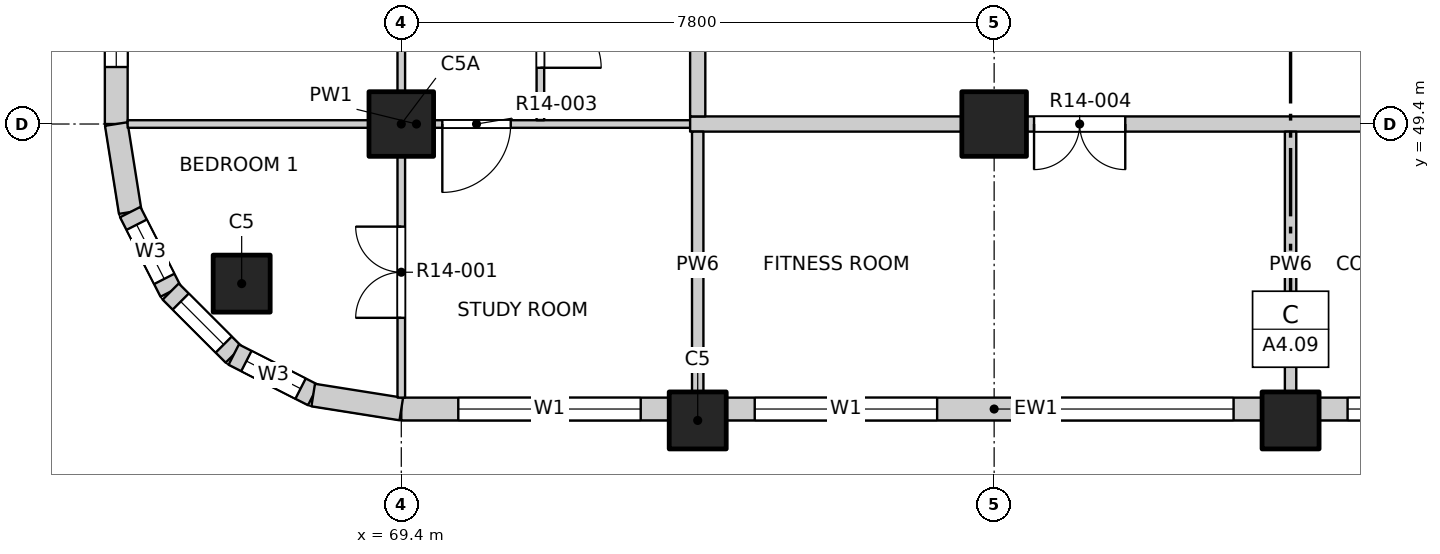
"""IFC4 building model, lengths in metres.
Left out: names, types, materials, properties, quantities, classifications, styles, units other than length and angle.
Written with IfcOpenShell. Run it as: python <this file> out.ifc"""

import sys

from ifc_helpers import new_model, si_unit, direction, frame, frame_2d, origin, origin_2d, place, context, subcontext, project, spatial, rectangle, extrude, element, fill, save


model = new_model("IFC4")
c1 = context("Model", 3, precision=1e-05, world=origin(), true_north=direction((0.0, 1.0)))
c2 = subcontext(c1, "Body", "Model", "MODEL_VIEW")
j1 = project(units=[si_unit("LENGTHUNIT", "METRE"), si_unit("PLANEANGLEUNIT", "RADIAN")], contexts=[c1])
p1 = place(None, origin())
s1 = spatial("IfcSite", under=j1, at=p1, CompositionType="ELEMENT")
p2 = place(p1, origin())
s2 = spatial("IfcBuilding", under=s1, at=p2, CompositionType="ELEMENT")
p3 = place(p2, frame((0.0, 0.0, 148.6)))
s3 = spatial("IfcBuildingStorey", under=s2, at=p3, CompositionType="ELEMENT", Elevation=148.6)
for number, where, z_axis, x_axis in (
    (1, (67.3, 47.3, -0.3), (0.0, 0.0, 1.0), (1.0, 0.0, 0.0)),
    (2, (73.3, 45.5, -0.3), (0.0, 0.0, 1.0), (1.0, 0.0, 0.0)),
    (3, (81.1, 45.5, -0.3), (0.0, 0.0, 1.0), (1.0, 0.0, 0.0)),
):
    element("IfcColumn", number, at=place(p3, frame(where, z_axis=z_axis, x_axis=x_axis)), inside=s3, PredefinedType="COLUMN", context=c2, shape_type="SweptSolid", body=[
        extrude(rectangle(XDim=0.75, YDim=0.75, at=origin_2d()), origin(), (0.0, 0.0, 1.0), 3.45),
    ])
for number, where, z_axis, x_axis in (
    (4, (69.4, 49.4, -0.3), (0.0, 0.0, 1.0), (1.0, 0.0, 0.0)),
    (5, (77.2, 49.4, -0.3), (0.0, 0.0, 1.0), (1.0, 0.0, 0.0)),
):
    element("IfcColumn", number, at=place(p3, frame(where, z_axis=z_axis, x_axis=x_axis)), inside=s3, PredefinedType="COLUMN", context=c2, shape_type="SweptSolid", body=[
        extrude(rectangle(XDim=0.85, YDim=0.85, at=origin_2d()), origin(), (0.0, 0.0, 1.0), 3.45),
    ])
p4 = place(p3, frame((69.4, 45.65, 0.0), z_axis=(0.0, 0.0, 1.0), x_axis=(1.0, 0.0, 0.0)))
e6 = element("IfcWall", 6, at=p4, inside=s3, PredefinedType="SOLIDWALL", context=c2, shape_type="SweptSolid", body=[
    extrude(rectangle(XDim=3.525, YDim=0.3, at=frame_2d((1.763, 0.0))), origin(), (0.0, 0.0, 1.0), 2.7),
])
p5 = place(p4, frame((0.75, 0.0, 0.9)))
e7 = element("IfcOpeningElement", 7, at=p5, cuts=e6, PredefinedType="OPENING", context=c2, shape_type="SweptSolid", body=[
    extrude(rectangle(XDim=2.4, YDim=1.8, at=frame_2d((1.2, 0.9))), frame((0.0, 0.16, 0.0), z_axis=(0.0, -1.0, 0.0), x_axis=(1.0, 0.0, 0.0)), (0.0, 0.0, 1.0), 0.32),
])
p6 = place(p3, frame((73.675, 45.65, 0.0), z_axis=(0.0, 0.0, 1.0), x_axis=(1.0, 0.0, 0.0)))
e8 = element("IfcWall", 8, at=p6, inside=s3, PredefinedType="SOLIDWALL", context=c2, shape_type="SweptSolid", body=[
    extrude(rectangle(XDim=7.05, YDim=0.3, at=frame_2d((3.525, 0.0))), origin(), (0.0, 0.0, 1.0), 2.7),
])
p7 = place(p6, frame((0.375, 0.0, 0.9)))
e9 = element("IfcOpeningElement", 9, at=p7, cuts=e8, PredefinedType="OPENING", context=c2, shape_type="SweptSolid", body=[
    extrude(rectangle(XDim=2.4, YDim=1.8, at=frame_2d((1.2, 0.9))), frame((0.0, 0.16, 0.0), z_axis=(0.0, -1.0, 0.0), x_axis=(1.0, 0.0, 0.0)), (0.0, 0.0, 1.0), 0.32),
])
p8 = place(p6, frame((4.275, 0.0, 0.9)))
e10 = element("IfcOpeningElement", 10, at=p8, cuts=e8, PredefinedType="OPENING", context=c2, shape_type="SweptSolid", body=[
    extrude(rectangle(XDim=2.4, YDim=1.8, at=frame_2d((1.2, 0.9))), frame((0.0, 0.16, 0.0), z_axis=(0.0, -1.0, 0.0), x_axis=(1.0, 0.0, 0.0)), (0.0, 0.0, 1.0), 0.32),
])
p9 = place(p3, frame((81.475, 45.65, 0.0), z_axis=(0.0, 0.0, 1.0), x_axis=(1.0, 0.0, 0.0)))
e11 = element("IfcWall", 11, at=p9, inside=s3, PredefinedType="SOLIDWALL", context=c2, shape_type="SweptSolid", body=[
    extrude(rectangle(XDim=7.05, YDim=0.3, at=frame_2d((3.525, 0.0))), origin(), (0.0, 0.0, 1.0), 2.7),
])
p10 = place(p9, frame((0.375, 0.0, 0.9)))
e12 = element("IfcOpeningElement", 12, at=p10, cuts=e11, PredefinedType="OPENING", context=c2, shape_type="SweptSolid", body=[
    extrude(rectangle(XDim=2.4, YDim=1.8, at=frame_2d((1.2, 0.9))), frame((0.0, 0.16, 0.0), z_axis=(0.0, -1.0, 0.0), x_axis=(1.0, 0.0, 0.0)), (0.0, 0.0, 1.0), 0.32),
])
p11 = place(p9, frame((4.275, 0.0, 0.9)))
e13 = element("IfcOpeningElement", 13, at=p11, cuts=e11, PredefinedType="OPENING", context=c2, shape_type="SweptSolid", body=[
    extrude(rectangle(XDim=2.4, YDim=1.8, at=frame_2d((1.2, 0.9))), frame((0.0, 0.16, 0.0), z_axis=(0.0, -1.0, 0.0), x_axis=(1.0, 0.0, 0.0)), (0.0, 0.0, 1.0), 0.32),
])
p12 = place(p3, frame((65.65, 49.4, 0.0), z_axis=(0.0, 0.0, 1.0), x_axis=(0.0, 1.0, 0.0)))
e14 = element("IfcWall", 14, at=p12, inside=s3, PredefinedType="SOLIDWALL", context=c2, shape_type="SweptSolid", body=[
    extrude(rectangle(XDim=3.525, YDim=0.3, at=frame_2d((1.763, 0.0))), origin(), (0.0, 0.0, 1.0), 2.7),
])
p13 = place(p12, frame((0.75, 0.0, 0.9)))
e15 = element("IfcOpeningElement", 15, at=p13, cuts=e14, PredefinedType="OPENING", context=c2, shape_type="SweptSolid", body=[
    extrude(rectangle(XDim=2.4, YDim=1.8, at=frame_2d((1.2, 0.9))), frame((0.0, 0.16, 0.0), z_axis=(0.0, -1.0, 0.0), x_axis=(1.0, 0.0, 0.0)), (0.0, 0.0, 1.0), 0.32),
])
p14 = place(p3, frame((65.65, 49.4, 0.0), z_axis=(0.0, 0.0, 1.0), x_axis=(0.156496880861, -0.987678452879, 0.0)))
e16 = element("IfcWall", 16, at=p14, inside=s3, PredefinedType="SOLIDWALL", context=c2, shape_type="SweptSolid", body=[
    extrude(rectangle(XDim=1.173, YDim=0.3, at=frame_2d((0.586, 0.0))), origin(), (0.0, 0.0, 1.0), 2.7),
])
p15 = place(p3, frame((65.833, 48.241, 0.0), z_axis=(0.0, 0.0, 1.0), x_axis=(0.454025524128, -0.890988677504, 0.0)))
e17 = element("IfcWall", 17, at=p15, inside=s3, PredefinedType="SOLIDWALL", context=c2, shape_type="SweptSolid", body=[
    extrude(rectangle(XDim=1.173, YDim=0.3, at=frame_2d((0.587, 0.0))), origin(), (0.0, 0.0, 1.0), 2.7),
])
p16 = place(p15, frame((0.187, 0.0, 0.9)))
e18 = element("IfcOpeningElement", 18, at=p16, cuts=e17, PredefinedType="OPENING", context=c2, shape_type="SweptSolid", body=[
    extrude(rectangle(XDim=0.8, YDim=1.2, at=frame_2d((0.4, 0.6))), frame((0.0, 0.16, 0.0), z_axis=(0.0, -1.0, 0.0), x_axis=(1.0, 0.0, 0.0)), (0.0, 0.0, 1.0), 0.32),
])
p17 = place(p3, frame((66.366, 47.196, 0.0), z_axis=(0.0, 0.0, 1.0), x_axis=(0.707106781187, -0.707106781187, 0.0)))
e19 = element("IfcWall", 19, at=p17, inside=s3, PredefinedType="SOLIDWALL", context=c2, shape_type="SweptSolid", body=[
    extrude(rectangle(XDim=1.173, YDim=0.3, at=frame_2d((0.586, 0.0))), origin(), (0.0, 0.0, 1.0), 2.7),
])
p18 = place(p17, frame((0.187, 0.0, 0.9)))
e20 = element("IfcOpeningElement", 20, at=p18, cuts=e19, PredefinedType="OPENING", context=c2, shape_type="SweptSolid", body=[
    extrude(rectangle(XDim=0.8, YDim=1.2, at=frame_2d((0.4, 0.6))), frame((0.0, 0.16, 0.0), z_axis=(0.0, -1.0, 0.0), x_axis=(1.0, 0.0, 0.0)), (0.0, 0.0, 1.0), 0.32),
])
p19 = place(p3, frame((67.196, 46.366, 0.0), z_axis=(0.0, 0.0, 1.0), x_axis=(0.890988677504, -0.454025524128, 0.0)))
e21 = element("IfcWall", 21, at=p19, inside=s3, PredefinedType="SOLIDWALL", context=c2, shape_type="SweptSolid", body=[
    extrude(rectangle(XDim=1.173, YDim=0.3, at=frame_2d((0.587, 0.0))), origin(), (0.0, 0.0, 1.0), 2.7),
])
p20 = place(p19, frame((0.187, 0.0, 0.9)))
e22 = element("IfcOpeningElement", 22, at=p20, cuts=e21, PredefinedType="OPENING", context=c2, shape_type="SweptSolid", body=[
    extrude(rectangle(XDim=0.8, YDim=1.2, at=frame_2d((0.4, 0.6))), frame((0.0, 0.16, 0.0), z_axis=(0.0, -1.0, 0.0), x_axis=(1.0, 0.0, 0.0)), (0.0, 0.0, 1.0), 0.32),
])
p21 = place(p3, frame((68.241, 45.833, 0.0), z_axis=(0.0, 0.0, 1.0), x_axis=(0.987678452879, -0.156496880861, 0.0)))
e23 = element("IfcWall", 23, at=p21, inside=s3, PredefinedType="SOLIDWALL", context=c2, shape_type="SweptSolid", body=[
    extrude(rectangle(XDim=1.173, YDim=0.3, at=frame_2d((0.586, 0.0))), origin(), (0.0, 0.0, 1.0), 2.7),
])
p22 = place(p3, frame((65.8, 49.4, 0.0), z_axis=(0.0, 0.0, 1.0), x_axis=(1.0, 0.0, 0.0)))
e24 = element("IfcWall", 24, at=p22, inside=s3, PredefinedType="PARTITIONING", context=c2, shape_type="SweptSolid", body=[
    extrude(rectangle(XDim=7.6, YDim=0.1, at=frame_2d((3.8, 0.0))), origin(), (0.0, 0.0, 1.0), 3.15),
])
p23 = place(p22, frame((4.14, 0.0, 0.0)))
e25 = element("IfcOpeningElement", 25, at=p23, cuts=e24, PredefinedType="OPENING", context=c2, shape_type="SweptSolid", body=[
    extrude(rectangle(XDim=0.9, YDim=2.1, at=frame_2d((0.45, 1.05))), frame((0.0, 0.06, 0.0), z_axis=(0.0, -1.0, 0.0), x_axis=(1.0, 0.0, 0.0)), (0.0, 0.0, 1.0), 0.12),
])
p24 = place(p3, frame((73.2, 49.4, 0.0), z_axis=(0.0, 0.0, 1.0), x_axis=(1.0, 0.0, 0.0)))
e26 = element("IfcWall", 26, at=p24, inside=s3, PredefinedType="PARTITIONING", context=c2, shape_type="SweptSolid", body=[
    extrude(rectangle(XDim=23.6, YDim=0.2, at=frame_2d((11.8, 0.0))), origin(), (0.0, 0.0, 1.0), 3.15),
])
p25 = place(p24, frame((4.525, 0.0, 0.0)))
e27 = element("IfcOpeningElement", 27, at=p25, cuts=e26, PredefinedType="OPENING", context=c2, shape_type="SweptSolid", body=[
    extrude(rectangle(XDim=1.2, YDim=2.1, at=frame_2d((0.6, 1.05))), frame((0.0, 0.11, 0.0), z_axis=(0.0, -1.0, 0.0), x_axis=(1.0, 0.0, 0.0)), (0.0, 0.0, 1.0), 0.22),
])
p26 = place(p24, frame((12.325, 0.0, 0.0)))
e28 = element("IfcOpeningElement", 28, at=p26, cuts=e26, PredefinedType="OPENING", context=c2, shape_type="SweptSolid", body=[
    extrude(rectangle(XDim=1.2, YDim=2.1, at=frame_2d((0.6, 1.05))), frame((0.0, 0.11, 0.0), z_axis=(0.0, -1.0, 0.0), x_axis=(1.0, 0.0, 0.0)), (0.0, 0.0, 1.0), 0.22),
])
p27 = place(p24, frame((20.125, 0.0, 0.0)))
e29 = element("IfcOpeningElement", 29, at=p27, cuts=e26, PredefinedType="OPENING", context=c2, shape_type="SweptSolid", body=[
    extrude(rectangle(XDim=1.2, YDim=2.1, at=frame_2d((0.6, 1.05))), frame((0.0, 0.11, 0.0), z_axis=(0.0, -1.0, 0.0), x_axis=(1.0, 0.0, 0.0)), (0.0, 0.0, 1.0), 0.22),
])
p28 = place(p3, frame((69.4, 45.8, 0.0), z_axis=(0.0, 0.0, 1.0), x_axis=(0.0, 1.0, 0.0)))
e30 = element("IfcWall", 30, at=p28, inside=s3, PredefinedType="PARTITIONING", context=c2, shape_type="SweptSolid", body=[
    extrude(rectangle(XDim=38.4, YDim=0.1, at=frame_2d((19.2, 0.0))), origin(), (0.0, 0.0, 1.0), 3.15),
])
p29 = place(p28, frame((1.05, 0.0, 0.0)))
e31 = element("IfcOpeningElement", 31, at=p29, cuts=e30, PredefinedType="OPENING", context=c2, shape_type="SweptSolid", body=[
    extrude(rectangle(XDim=1.2, YDim=2.1, at=frame_2d((0.6, 1.05))), frame((0.0, 0.06, 0.0), z_axis=(0.0, -1.0, 0.0), x_axis=(1.0, 0.0, 0.0)), (0.0, 0.0, 1.0), 0.12),
])
p30 = place(p28, frame((6.9, 0.0, 0.0)))
e32 = element("IfcOpeningElement", 32, at=p30, cuts=e30, PredefinedType="OPENING", context=c2, shape_type="SweptSolid", body=[
    extrude(rectangle(XDim=1.2, YDim=2.1, at=frame_2d((0.6, 1.05))), frame((0.0, 0.06, 0.0), z_axis=(0.0, -1.0, 0.0), x_axis=(1.0, 0.0, 0.0)), (0.0, 0.0, 1.0), 0.12),
])
p31 = place(p28, frame((12.9, 0.0, 0.0)))
e33 = element("IfcOpeningElement", 33, at=p31, cuts=e30, PredefinedType="OPENING", context=c2, shape_type="SweptSolid", body=[
    extrude(rectangle(XDim=0.9, YDim=2.1, at=frame_2d((0.45, 1.05))), frame((0.0, 0.06, 0.0), z_axis=(0.0, -1.0, 0.0), x_axis=(1.0, 0.0, 0.0)), (0.0, 0.0, 1.0), 0.12),
])
p32 = place(p28, frame((16.8, 0.0, 0.0)))
e34 = element("IfcOpeningElement", 34, at=p32, cuts=e30, PredefinedType="OPENING", context=c2, shape_type="SweptSolid", body=[
    extrude(rectangle(XDim=0.9, YDim=2.1, at=frame_2d((0.45, 1.05))), frame((0.0, 0.06, 0.0), z_axis=(0.0, -1.0, 0.0), x_axis=(1.0, 0.0, 0.0)), (0.0, 0.0, 1.0), 0.12),
])
p33 = place(p28, frame((20.7, 0.0, 0.0)))
e35 = element("IfcOpeningElement", 35, at=p33, cuts=e30, PredefinedType="OPENING", context=c2, shape_type="SweptSolid", body=[
    extrude(rectangle(XDim=0.9, YDim=2.1, at=frame_2d((0.45, 1.05))), frame((0.0, 0.06, 0.0), z_axis=(0.0, -1.0, 0.0), x_axis=(1.0, 0.0, 0.0)), (0.0, 0.0, 1.0), 0.12),
])
p34 = place(p28, frame((24.6, 0.0, 0.0)))
e36 = element("IfcOpeningElement", 36, at=p34, cuts=e30, PredefinedType="OPENING", context=c2, shape_type="SweptSolid", body=[
    extrude(rectangle(XDim=0.9, YDim=2.1, at=frame_2d((0.45, 1.05))), frame((0.0, 0.06, 0.0), z_axis=(0.0, -1.0, 0.0), x_axis=(1.0, 0.0, 0.0)), (0.0, 0.0, 1.0), 0.12),
])
p35 = place(p28, frame((28.5, 0.0, 0.0)))
e37 = element("IfcOpeningElement", 37, at=p35, cuts=e30, PredefinedType="OPENING", context=c2, shape_type="SweptSolid", body=[
    extrude(rectangle(XDim=0.9, YDim=2.1, at=frame_2d((0.45, 1.05))), frame((0.0, 0.06, 0.0), z_axis=(0.0, -1.0, 0.0), x_axis=(1.0, 0.0, 0.0)), (0.0, 0.0, 1.0), 0.12),
])
p36 = place(p28, frame((32.4, 0.0, 0.0)))
e38 = element("IfcOpeningElement", 38, at=p36, cuts=e30, PredefinedType="OPENING", context=c2, shape_type="SweptSolid", body=[
    extrude(rectangle(XDim=0.9, YDim=2.1, at=frame_2d((0.45, 1.05))), frame((0.0, 0.06, 0.0), z_axis=(0.0, -1.0, 0.0), x_axis=(1.0, 0.0, 0.0)), (0.0, 0.0, 1.0), 0.12),
])
p37 = place(p28, frame((36.15, 0.0, 0.0)))
e39 = element("IfcOpeningElement", 39, at=p37, cuts=e30, PredefinedType="OPENING", context=c2, shape_type="SweptSolid", body=[
    extrude(rectangle(XDim=1.2, YDim=2.1, at=frame_2d((0.6, 1.05))), frame((0.0, 0.06, 0.0), z_axis=(0.0, -1.0, 0.0), x_axis=(1.0, 0.0, 0.0)), (0.0, 0.0, 1.0), 0.12),
])
p38 = place(p3, frame((71.23, 49.45, 0.0), z_axis=(0.0, 0.0, 1.0), x_axis=(0.0, 1.0, 0.0)))
e40 = element("IfcWall", 40, at=p38, inside=s3, PredefinedType="PARTITIONING", context=c2, shape_type="SweptSolid", body=[
    extrude(rectangle(XDim=8.85, YDim=0.1, at=frame_2d((4.425, 0.0))), origin(), (0.0, 0.0, 1.0), 3.15),
])
p39 = place(p38, frame((0.69, 0.0, 0.0)))
e41 = element("IfcOpeningElement", 41, at=p39, cuts=e40, PredefinedType="OPENING", context=c2, shape_type="SweptSolid", body=[
    extrude(rectangle(XDim=0.8, YDim=2.1, at=frame_2d((0.4, 1.05))), frame((0.0, 0.06, 0.0), z_axis=(0.0, -1.0, 0.0), x_axis=(1.0, 0.0, 0.0)), (0.0, 0.0, 1.0), 0.12),
])
p40 = place(p38, frame((2.68, 0.0, 0.0)))
e42 = element("IfcOpeningElement", 42, at=p40, cuts=e40, PredefinedType="OPENING", context=c2, shape_type="SweptSolid", body=[
    extrude(rectangle(XDim=0.9, YDim=2.1, at=frame_2d((0.45, 1.05))), frame((0.0, 0.06, 0.0), z_axis=(0.0, -1.0, 0.0), x_axis=(1.0, 0.0, 0.0)), (0.0, 0.0, 1.0), 0.12),
])
p41 = place(p38, frame((4.965, 0.0, 0.0)))
e43 = element("IfcOpeningElement", 43, at=p41, cuts=e40, PredefinedType="OPENING", context=c2, shape_type="SweptSolid", body=[
    extrude(rectangle(XDim=0.9, YDim=2.1, at=frame_2d((0.45, 1.05))), frame((0.0, 0.06, 0.0), z_axis=(0.0, -1.0, 0.0), x_axis=(1.0, 0.0, 0.0)), (0.0, 0.0, 1.0), 0.12),
])
p42 = place(p38, frame((7.4, 0.0, 0.0)))
e44 = element("IfcOpeningElement", 44, at=p42, cuts=e40, PredefinedType="OPENING", context=c2, shape_type="SweptSolid", body=[
    extrude(rectangle(XDim=0.9, YDim=2.1, at=frame_2d((0.45, 1.05))), frame((0.0, 0.06, 0.0), z_axis=(0.0, -1.0, 0.0), x_axis=(1.0, 0.0, 0.0)), (0.0, 0.0, 1.0), 0.12),
])
p43 = place(p3, frame((73.3, 45.8, 0.0), z_axis=(0.0, 0.0, 1.0), x_axis=(0.0, 1.0, 0.0)))
e45 = element("IfcWall", 45, at=p43, inside=s3, PredefinedType="PARTITIONING", context=c2, shape_type="SweptSolid", body=[
    extrude(rectangle(XDim=3.5, YDim=0.15, at=frame_2d((1.75, 0.0))), origin(), (0.0, 0.0, 1.0), 3.15),
])
p44 = place(p3, frame((73.3, 49.5, 0.0), z_axis=(0.0, 0.0, 1.0), x_axis=(0.0, 1.0, 0.0)))
e46 = element("IfcWall", 46, at=p44, inside=s3, PredefinedType="PARTITIONING", context=c2, shape_type="SweptSolid", body=[
    extrude(rectangle(XDim=34.7, YDim=0.2, at=frame_2d((17.35, 0.0))), origin(), (0.0, 0.0, 1.0), 3.15),
])
p45 = place(p44, frame((10.125, 0.0, 0.0)))
e47 = element("IfcOpeningElement", 47, at=p45, cuts=e46, PredefinedType="OPENING", context=c2, shape_type="SweptSolid", body=[
    extrude(rectangle(XDim=1.0, YDim=2.1, at=frame_2d((0.5, 1.05))), frame((0.0, 0.11, 0.0), z_axis=(0.0, -1.0, 0.0), x_axis=(1.0, 0.0, 0.0)), (0.0, 0.0, 1.0), 0.22),
])
p46 = place(p44, frame((14.575, 0.0, 0.0)))
e48 = element("IfcOpeningElement", 48, at=p46, cuts=e46, PredefinedType="OPENING", context=c2, shape_type="SweptSolid", body=[
    extrude(rectangle(XDim=1.0, YDim=2.1, at=frame_2d((0.5, 1.05))), frame((0.0, 0.11, 0.0), z_axis=(0.0, -1.0, 0.0), x_axis=(1.0, 0.0, 0.0)), (0.0, 0.0, 1.0), 0.22),
])
p47 = place(p44, frame((26.575, 0.0, 0.0)))
e49 = element("IfcOpeningElement", 49, at=p47, cuts=e46, PredefinedType="OPENING", context=c2, shape_type="SweptSolid", body=[
    extrude(rectangle(XDim=1.0, YDim=2.1, at=frame_2d((0.5, 1.05))), frame((0.0, 0.11, 0.0), z_axis=(0.0, -1.0, 0.0), x_axis=(1.0, 0.0, 0.0)), (0.0, 0.0, 1.0), 0.22),
])
p48 = place(p3, frame((81.1, 45.8, 0.0), z_axis=(0.0, 0.0, 1.0), x_axis=(0.0, 1.0, 0.0)))
e50 = element("IfcWall", 50, at=p48, inside=s3, PredefinedType="PARTITIONING", context=c2, shape_type="SweptSolid", body=[
    extrude(rectangle(XDim=3.5, YDim=0.15, at=frame_2d((1.75, 0.0))), origin(), (0.0, 0.0, 1.0), 3.15),
])
p49 = place(p5, origin())
e51 = element("IfcWindow", 51, at=p49, inside=s3, PartitioningType="DOUBLE_PANEL_VERTICAL", PredefinedType="WINDOW", context=c2, shape_type="SweptSolid", body=[
    extrude(rectangle(XDim=2.4, YDim=1.8, at=frame_2d((1.2, 0.9))), frame((0.0, 0.03, 0.0), z_axis=(0.0, -1.0, 0.0), x_axis=(1.0, 0.0, 0.0)), (0.0, 0.0, 1.0), 0.06),
])
fill(e7, e51)
p50 = place(p7, origin())
e52 = element("IfcWindow", 52, at=p50, inside=s3, PartitioningType="DOUBLE_PANEL_VERTICAL", PredefinedType="WINDOW", context=c2, shape_type="SweptSolid", body=[
    extrude(rectangle(XDim=2.4, YDim=1.8, at=frame_2d((1.2, 0.9))), frame((0.0, 0.03, 0.0), z_axis=(0.0, -1.0, 0.0), x_axis=(1.0, 0.0, 0.0)), (0.0, 0.0, 1.0), 0.06),
])
fill(e9, e52)
p51 = place(p8, origin())
e53 = element("IfcWindow", 53, at=p51, inside=s3, PartitioningType="DOUBLE_PANEL_VERTICAL", PredefinedType="WINDOW", context=c2, shape_type="SweptSolid", body=[
    extrude(rectangle(XDim=2.4, YDim=1.8, at=frame_2d((1.2, 0.9))), frame((0.0, 0.03, 0.0), z_axis=(0.0, -1.0, 0.0), x_axis=(1.0, 0.0, 0.0)), (0.0, 0.0, 1.0), 0.06),
])
fill(e10, e53)
p52 = place(p10, origin())
e54 = element("IfcWindow", 54, at=p52, inside=s3, PartitioningType="DOUBLE_PANEL_VERTICAL", PredefinedType="WINDOW", context=c2, shape_type="SweptSolid", body=[
    extrude(rectangle(XDim=2.4, YDim=1.8, at=frame_2d((1.2, 0.9))), frame((0.0, 0.03, 0.0), z_axis=(0.0, -1.0, 0.0), x_axis=(1.0, 0.0, 0.0)), (0.0, 0.0, 1.0), 0.06),
])
fill(e12, e54)
p53 = place(p13, origin())
e55 = element("IfcWindow", 55, at=p53, inside=s3, PartitioningType="DOUBLE_PANEL_VERTICAL", PredefinedType="WINDOW", context=c2, shape_type="SweptSolid", body=[
    extrude(rectangle(XDim=2.4, YDim=1.8, at=frame_2d((1.2, 0.9))), frame((0.0, 0.03, 0.0), z_axis=(0.0, -1.0, 0.0), x_axis=(1.0, 0.0, 0.0)), (0.0, 0.0, 1.0), 0.06),
])
fill(e15, e55)
p54 = place(p16, origin())
e56 = element("IfcWindow", 56, at=p54, inside=s3, PartitioningType="SINGLE_PANEL", PredefinedType="WINDOW", context=c2, shape_type="SweptSolid", body=[
    extrude(rectangle(XDim=0.8, YDim=1.2, at=frame_2d((0.4, 0.6))), frame((0.0, 0.03, 0.0), z_axis=(0.0, -1.0, 0.0), x_axis=(1.0, 0.0, 0.0)), (0.0, 0.0, 1.0), 0.06),
])
fill(e18, e56)
p55 = place(p18, origin())
e57 = element("IfcWindow", 57, at=p55, inside=s3, PartitioningType="SINGLE_PANEL", PredefinedType="WINDOW", context=c2, shape_type="SweptSolid", body=[
    extrude(rectangle(XDim=0.8, YDim=1.2, at=frame_2d((0.4, 0.6))), frame((0.0, 0.03, 0.0), z_axis=(0.0, -1.0, 0.0), x_axis=(1.0, 0.0, 0.0)), (0.0, 0.0, 1.0), 0.06),
])
fill(e20, e57)
p56 = place(p20, origin())
e58 = element("IfcWindow", 58, at=p56, inside=s3, PartitioningType="SINGLE_PANEL", PredefinedType="WINDOW", context=c2, shape_type="SweptSolid", body=[
    extrude(rectangle(XDim=0.8, YDim=1.2, at=frame_2d((0.4, 0.6))), frame((0.0, 0.03, 0.0), z_axis=(0.0, -1.0, 0.0), x_axis=(1.0, 0.0, 0.0)), (0.0, 0.0, 1.0), 0.06),
])
fill(e22, e58)
p57 = place(p29, origin())
e59 = element("IfcDoor", 59, at=p57, inside=s3, OperationType="DOUBLE_DOOR_SINGLE_SWING", PredefinedType="DOOR", context=c2, shape_type="SweptSolid", body=[
    extrude(rectangle(XDim=1.2, YDim=2.1, at=frame_2d((0.6, 1.05))), frame((0.0, 0.025, 0.0), z_axis=(0.0, -1.0, 0.0), x_axis=(1.0, 0.0, 0.0)), (0.0, 0.0, 1.0), 0.05),
])
fill(e31, e59)
p58 = place(p23, origin())
e60 = element("IfcDoor", 60, at=p58, inside=s3, OperationType="SINGLE_SWING_RIGHT", PredefinedType="DOOR", context=c2, shape_type="SweptSolid", body=[
    extrude(rectangle(XDim=0.9, YDim=2.1, at=frame_2d((0.45, 1.05))), frame((0.0, 0.025, 0.0), z_axis=(0.0, -1.0, 0.0), x_axis=(1.0, 0.0, 0.0)), (0.0, 0.0, 1.0), 0.05),
])
fill(e25, e60)
p59 = place(p25, origin())
e61 = element("IfcDoor", 61, at=p59, inside=s3, OperationType="DOUBLE_DOOR_SINGLE_SWING", PredefinedType="DOOR", context=c2, shape_type="SweptSolid", body=[
    extrude(rectangle(XDim=1.2, YDim=2.1, at=frame_2d((0.6, 1.05))), frame((0.0, 0.025, 0.0), z_axis=(0.0, -1.0, 0.0), x_axis=(1.0, 0.0, 0.0)), (0.0, 0.0, 1.0), 0.05),
])
fill(e27, e61)
p60 = place(p39, origin())
e62 = element("IfcDoor", 62, at=p60, inside=s3, OperationType="SINGLE_SWING_RIGHT", PredefinedType="DOOR", context=c2, shape_type="SweptSolid", body=[
    extrude(rectangle(XDim=0.8, YDim=2.1, at=frame_2d((0.4, 1.05))), frame((0.0, 0.025, 0.0), z_axis=(0.0, -1.0, 0.0), x_axis=(1.0, 0.0, 0.0)), (0.0, 0.0, 1.0), 0.05),
])
fill(e41, e62)
save(model, sys.argv[1])
